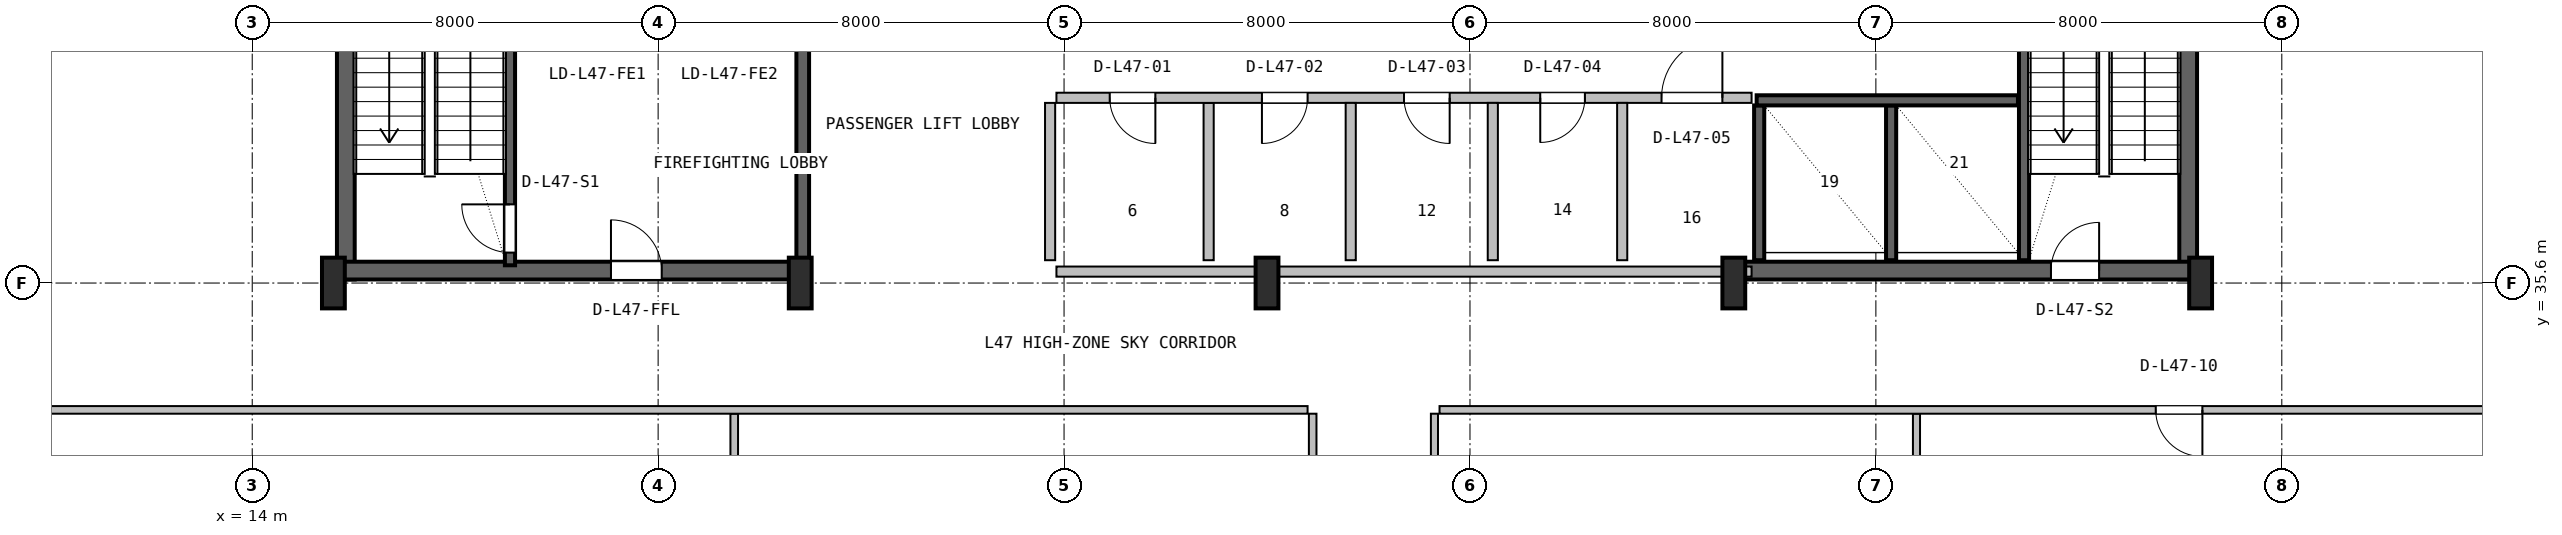
"""IFC4 building model, lengths in metres.
Left out: names, types, materials, properties, quantities, classifications, styles, units other than length and angle.
Written with IfcOpenShell. Run it as: python <this file> out.ifc"""

import sys

from ifc_helpers import new_model, si_unit, direction, frame, frame_2d, origin, origin_2d, place, context, subcontext, project, spatial, rectangle, i_section, extrude, source, transform, mapped, element, fill, save


model = new_model("IFC4")
c1 = context("Model", 3, precision=1e-05, world=origin(), true_north=direction((0.0, 1.0)))
c2 = subcontext(c1, "Body", "Model", "MODEL_VIEW")
j1 = project(units=[si_unit("LENGTHUNIT", "METRE"), si_unit("PLANEANGLEUNIT", "RADIAN")], contexts=[c1])
p1 = place(None, origin())
s1 = spatial("IfcSite", under=j1, at=p1, CompositionType="ELEMENT")
p2 = place(p1, origin())
s2 = spatial("IfcBuilding", under=s1, at=p2, CompositionType="ELEMENT")
p3 = place(p2, frame((0.0, 0.0, 191.4)))
s3 = spatial("IfcBuildingStorey", under=s2, at=p3, CompositionType="ELEMENT", Elevation=191.4)
for number, where, z_axis, x_axis in (
    (1, (15.845, 35.67, 0.0), (0.0, 0.0, 1.0), (0.0, 1.0, 0.0)),
    (2, (52.155, 35.67, 0.0), (0.0, 0.0, 1.0), (0.0, 1.0, 0.0)),
):
    element("IfcWall", number, at=place(p3, frame(where, z_axis=z_axis, x_axis=x_axis)), inside=s3, PredefinedType="SHEAR", context=c2, shape_type="SweptSolid", body=[
        extrude(rectangle(XDim=11.13, YDim=0.35, at=frame_2d((5.565, 0.0))), origin(), (0.0, 0.0, 1.0), 4.35),
    ])
p4 = place(p3, frame((15.67, 35.845, 0.0), z_axis=(0.0, 0.0, 1.0), x_axis=(1.0, 0.0, 0.0)))
e3 = element("IfcWall", 3, at=p4, inside=s3, PredefinedType="SHEAR", context=c2, shape_type="SweptSolid", body=[
    extrude(rectangle(XDim=9.13, YDim=0.35, at=frame_2d((4.565, 0.0))), origin(), (0.0, 0.0, 1.0), 4.35),
])
p5 = place(p4, frame((5.4, 0.0, 0.0)))
e4 = element("IfcOpeningElement", 4, at=p5, cuts=e3, PredefinedType="OPENING", context=c2, shape_type="SweptSolid", body=[
    extrude(rectangle(XDim=1.0, YDim=2.1, at=frame_2d((0.5, 1.05))), frame((0.0, 0.185, 0.0), z_axis=(0.0, -1.0, 0.0), x_axis=(1.0, 0.0, 0.0)), (0.0, 0.0, 1.0), 0.37),
])
p6 = place(p3, frame((43.2, 35.845, 0.0), z_axis=(0.0, 0.0, 1.0), x_axis=(1.0, 0.0, 0.0)))
e5 = element("IfcWall", 5, at=p6, inside=s3, PredefinedType="SHEAR", context=c2, shape_type="SweptSolid", body=[
    extrude(rectangle(XDim=9.13, YDim=0.35, at=frame_2d((4.565, 0.0))), origin(), (0.0, 0.0, 1.0), 4.35),
])
p7 = place(p6, frame((6.25, 0.0, 0.0)))
e6 = element("IfcOpeningElement", 6, at=p7, cuts=e5, PredefinedType="OPENING", context=c2, shape_type="SweptSolid", body=[
    extrude(rectangle(XDim=0.95, YDim=2.1, at=frame_2d((0.475, 1.05))), frame((0.0, 0.185, 0.0), z_axis=(0.0, -1.0, 0.0), x_axis=(1.0, 0.0, 0.0)), (0.0, 0.0, 1.0), 0.37),
])
m1 = source(origin(), c2, "Body", "SweptSolid", [
    extrude(i_section(OverallWidth=0.45, OverallDepth=1.0, WebThickness=0.016, FlangeThickness=0.03, FilletRadius=0.016, at=origin_2d()), origin(), (0.0, 0.0, 1.0), 4.6),
])
for number, where, z_axis, x_axis in (
    (7, (15.6, 35.6, 0.0), (0.0, 0.0, 1.0), (1.0, 0.0, 0.0)),
    (8, (24.8, 35.6, 0.0), (0.0, 0.0, 1.0), (1.0, 0.0, 0.0)),
    (9, (34.0, 35.6, 0.0), (0.0, 0.0, 1.0), (1.0, 0.0, 0.0)),
    (10, (43.2, 35.6, 0.0), (0.0, 0.0, 1.0), (1.0, 0.0, 0.0)),
    (11, (52.4, 35.6, 0.0), (0.0, 0.0, 1.0), (1.0, 0.0, 0.0)),
):
    element("IfcColumn", number, at=place(p3, frame(where, z_axis=z_axis, x_axis=x_axis)), inside=s3, PredefinedType="COLUMN", context=c2, shape_type="MappedRepresentation", body=[
        mapped(m1, transform((0.0, 0.0, 0.0), x_axis=(1.0, 0.0, 0.0), y_axis=(0.0, 1.0, 0.0), z_axis=(0.0, 0.0, 1.0), scale=1.0)),
    ])
p8 = place(p3, frame((19.08, 35.95, 0.0), z_axis=(0.0, 0.0, 1.0), x_axis=(0.0, 1.0, 0.0)))
e12 = element("IfcWall", 12, at=p8, inside=s3, PredefinedType="SHEAR", context=c2, shape_type="SweptSolid", body=[
    extrude(rectangle(XDim=9.65, YDim=0.2, at=frame_2d((4.825, 0.0))), origin(), (0.0, 0.0, 1.0), 4.35),
])
p9 = place(p8, frame((0.25, 0.0, 0.0)))
e13 = element("IfcOpeningElement", 13, at=p9, cuts=e12, PredefinedType="OPENING", context=c2, shape_type="SweptSolid", body=[
    extrude(rectangle(XDim=0.95, YDim=2.1, at=frame_2d((0.475, 1.05))), frame((0.0, 0.11, 0.0), z_axis=(0.0, -1.0, 0.0), x_axis=(1.0, 0.0, 0.0)), (0.0, 0.0, 1.0), 0.22),
])
p10 = place(p3, frame((24.85, 36.05, 0.0), z_axis=(0.0, 0.0, 1.0), x_axis=(0.0, 1.0, 0.0)))
e14 = element("IfcWall", 14, at=p10, inside=s3, PredefinedType="SHEAR", context=c2, shape_type="SweptSolid", body=[
    extrude(rectangle(XDim=10.45, YDim=0.25, at=frame_2d((5.225, 0.0))), origin(), (0.0, 0.0, 1.0), 4.35),
])
p11 = place(p3, frame((48.92, 36.05, 0.0), z_axis=(0.0, 0.0, 1.0), x_axis=(0.0, 1.0, 0.0)))
e15 = element("IfcWall", 15, at=p11, inside=s3, PredefinedType="SHEAR", context=c2, shape_type="SweptSolid", body=[
    extrude(rectangle(XDim=10.5, YDim=0.2, at=frame_2d((5.25, 0.0))), origin(), (0.0, 0.0, 1.0), 4.35),
])
for number, where, z_axis, x_axis in (
    (16, (43.7, 36.05, 0.0), (0.0, 0.0, 1.0), (0.0, 1.0, 0.0)),
    (17, (46.3, 36.05, 0.0), (0.0, 0.0, 1.0), (0.0, 1.0, 0.0)),
):
    element("IfcWall", number, at=place(p3, frame(where, z_axis=z_axis, x_axis=x_axis)), inside=s3, PredefinedType="SHEAR", context=c2, shape_type="SweptSolid", body=[
        extrude(rectangle(XDim=3.05, YDim=0.2, at=frame_2d((1.525, 0.0))), origin(), (0.0, 0.0, 1.0), 4.35),
    ])
p12 = place(p3, frame((43.65, 39.2, 0.0), z_axis=(0.0, 0.0, 1.0), x_axis=(1.0, 0.0, 0.0)))
e18 = element("IfcWall", 18, at=p12, inside=s3, PredefinedType="SHEAR", context=c2, shape_type="SweptSolid", body=[
    extrude(rectangle(XDim=5.15, YDim=0.2, at=frame_2d((2.575, 0.0))), origin(), (0.0, 0.0, 1.0), 4.35),
])
p13 = place(p3, frame((29.85, 35.825, 0.0), z_axis=(0.0, 0.0, 1.0), x_axis=(1.0, 0.0, 0.0)))
e19 = element("IfcWall", 19, at=p13, inside=s3, PredefinedType="SOLIDWALL", context=c2, shape_type="SweptSolid", body=[
    extrude(rectangle(XDim=13.7, YDim=0.2, at=frame_2d((6.85, 0.0))), origin(), (0.0, 0.0, 1.0), 3.375),
])
p14 = place(p3, frame((32.85, 36.05, 0.0), z_axis=(0.0, 0.0, 1.0), x_axis=(0.0, 1.0, 0.0)))
e20 = element("IfcWall", 20, at=p14, inside=s3, PredefinedType="PLUMBINGWALL", context=c2, shape_type="SweptSolid", body=[
    extrude(rectangle(XDim=3.1, YDim=0.2, at=frame_2d((1.55, 0.0))), origin(), (0.0, 0.0, 1.0), 4.33),
])
p15 = place(p3, frame((29.85, 39.25, 0.0), z_axis=(0.0, 0.0, 1.0), x_axis=(1.0, 0.0, 0.0)))
e21 = element("IfcWall", 21, at=p15, inside=s3, PredefinedType="SOLIDWALL", context=c2, shape_type="SweptSolid", body=[
    extrude(rectangle(XDim=13.7, YDim=0.2, at=frame_2d((6.85, 0.0))), origin(), (0.0, 0.0, 1.0), 4.33),
])
p16 = place(p15, frame((1.05, 0.0, 0.0)))
e22 = element("IfcOpeningElement", 22, at=p16, cuts=e21, PredefinedType="OPENING", context=c2, shape_type="SweptSolid", body=[
    extrude(rectangle(XDim=0.9, YDim=2.06, at=frame_2d((0.45, 1.03))), frame((0.0, 0.11, 0.0), z_axis=(0.0, -1.0, 0.0), x_axis=(1.0, 0.0, 0.0)), (0.0, 0.0, 1.0), 0.22),
])
p17 = place(p15, frame((4.05, 0.0, 0.0)))
e23 = element("IfcOpeningElement", 23, at=p17, cuts=e21, PredefinedType="OPENING", context=c2, shape_type="SweptSolid", body=[
    extrude(rectangle(XDim=0.9, YDim=2.06, at=frame_2d((0.45, 1.03))), frame((0.0, 0.11, 0.0), z_axis=(0.0, -1.0, 0.0), x_axis=(1.0, 0.0, 0.0)), (0.0, 0.0, 1.0), 0.22),
])
p18 = place(p15, frame((6.85, 0.0, 0.0)))
e24 = element("IfcOpeningElement", 24, at=p18, cuts=e21, PredefinedType="OPENING", context=c2, shape_type="SweptSolid", body=[
    extrude(rectangle(XDim=0.9, YDim=2.06, at=frame_2d((0.45, 1.03))), frame((0.0, 0.11, 0.0), z_axis=(0.0, -1.0, 0.0), x_axis=(1.0, 0.0, 0.0)), (0.0, 0.0, 1.0), 0.22),
])
p19 = place(p15, frame((9.535, 0.0, 0.0)))
e25 = element("IfcOpeningElement", 25, at=p19, cuts=e21, PredefinedType="OPENING", context=c2, shape_type="SweptSolid", body=[
    extrude(rectangle(XDim=0.88, YDim=2.06, at=frame_2d((0.44, 1.03))), frame((0.0, 0.11, 0.0), z_axis=(0.0, -1.0, 0.0), x_axis=(1.0, 0.0, 0.0)), (0.0, 0.0, 1.0), 0.22),
])
p20 = place(p15, frame((11.925, 0.0, 0.0)))
e26 = element("IfcOpeningElement", 26, at=p20, cuts=e21, PredefinedType="OPENING", context=c2, shape_type="SweptSolid", body=[
    extrude(rectangle(XDim=1.2, YDim=2.1, at=frame_2d((0.6, 1.05))), frame((0.0, 0.11, 0.0), z_axis=(0.0, -1.0, 0.0), x_axis=(1.0, 0.0, 0.0)), (0.0, 0.0, 1.0), 0.22),
])
for number, where, z_axis, x_axis in (
    (27, (29.725, 36.05, 0.0), (0.0, 0.0, 1.0), (0.0, 1.0, 0.0)),
    (28, (35.65, 36.05, 0.0), (0.0, 0.0, 1.0), (0.0, 1.0, 0.0)),
    (29, (38.45, 36.05, 0.0), (0.0, 0.0, 1.0), (0.0, 1.0, 0.0)),
):
    element("IfcWall", number, at=place(p3, frame(where, z_axis=z_axis, x_axis=x_axis)), inside=s3, PredefinedType="PLUMBINGWALL", context=c2, shape_type="SweptSolid", body=[
        extrude(rectangle(XDim=3.1, YDim=0.2, at=frame_2d((1.55, 0.0))), origin(), (0.0, 0.0, 1.0), 4.33),
    ])
p21 = place(p3, frame((41.0, 36.05, 0.0), z_axis=(0.0, 0.0, 1.0), x_axis=(0.0, 1.0, 0.0)))
e30 = element("IfcWall", 30, at=p21, inside=s3, PredefinedType="SOLIDWALL", context=c2, shape_type="SweptSolid", body=[
    extrude(rectangle(XDim=3.1, YDim=0.2, at=frame_2d((1.55, 0.0))), origin(), (0.0, 0.0, 1.0), 4.33),
])
p22 = place(p3, frame((34.9, 7.38, 0.0), z_axis=(0.0, 0.0, 1.0), x_axis=(0.0, 1.0, 0.0)))
e31 = element("IfcWall", 31, at=p22, inside=s3, PredefinedType="PARTITIONING", context=c2, shape_type="SweptSolid", body=[
    extrude(rectangle(XDim=25.645, YDim=0.15, at=frame_2d((12.823, 0.0))), origin(), (0.0, 0.0, 1.0), 3.709),
])
p23 = place(p22, frame((6.54, 0.0, 0.0)))
e32 = element("IfcOpeningElement", 32, at=p23, cuts=e31, PredefinedType="OPENING", context=c2, shape_type="SweptSolid", body=[
    extrude(rectangle(XDim=1.55, YDim=2.12, at=frame_2d((0.775, 1.06))), frame((0.0, 0.085, 0.0), z_axis=(0.0, -1.0, 0.0), x_axis=(1.0, 0.0, 0.0)), (0.0, 0.0, 1.0), 0.17),
])
p24 = place(p22, frame((19.195, 0.0, 0.0)))
e33 = element("IfcOpeningElement", 33, at=p24, cuts=e31, PredefinedType="OPENING", context=c2, shape_type="SweptSolid", body=[
    extrude(rectangle(XDim=1.05, YDim=2.1, at=frame_2d((0.525, 1.05))), frame((0.0, 0.085, 0.0), z_axis=(0.0, -1.0, 0.0), x_axis=(1.0, 0.0, 0.0)), (0.0, 0.0, 1.0), 0.17),
])
p25 = place(p3, frame((23.5, 21.075, 0.0), z_axis=(0.0, 0.0, 1.0), x_axis=(0.0, 1.0, 0.0)))
e34 = element("IfcWall", 34, at=p25, inside=s3, PredefinedType="PARTITIONING", context=c2, shape_type="SweptSolid", body=[
    extrude(rectangle(XDim=11.95, YDim=0.15, at=frame_2d((5.975, 0.0))), origin(), (0.0, 0.0, 1.0), 4.022),
])
p26 = place(p3, frame((7.18, 33.1, 0.0), z_axis=(0.0, 0.0, 1.0), x_axis=(1.0, 0.0, 0.0)))
e35 = element("IfcWall", 35, at=p26, inside=s3, PredefinedType="PARTITIONING", context=c2, shape_type="SweptSolid", body=[
    extrude(rectangle(XDim=27.62, YDim=0.15, at=frame_2d((13.81, 0.0))), origin(), (0.0, 0.0, 1.0), 3.709),
])
p27 = place(p3, frame((46.8, 8.55, 0.0), z_axis=(0.0, 0.0, 1.0), x_axis=(0.0, 1.0, 0.0)))
e36 = element("IfcWall", 36, at=p27, inside=s3, PredefinedType="PARTITIONING", context=c2, shape_type="SweptSolid", body=[
    extrude(rectangle(XDim=24.475, YDim=0.14, at=frame_2d((12.237, 0.0))), origin(), (0.0, 0.0, 1.0), 4.022),
])
p28 = place(p3, frame((37.3, 7.38, 0.0), z_axis=(0.0, 0.0, 1.0), x_axis=(0.0, 1.0, 0.0)))
e37 = element("IfcWall", 37, at=p28, inside=s3, PredefinedType="PARTITIONING", context=c2, shape_type="SweptSolid", body=[
    extrude(rectangle(XDim=25.645, YDim=0.14, at=frame_2d((12.823, 0.0))), origin(), (0.0, 0.0, 1.0), 3.709),
])
p29 = place(p28, frame((7.565, 0.0, 0.0)))
e38 = element("IfcOpeningElement", 38, at=p29, cuts=e37, PredefinedType="OPENING", context=c2, shape_type="SweptSolid", body=[
    extrude(rectangle(XDim=1.0, YDim=2.1, at=frame_2d((0.5, 1.05))), frame((0.0, 0.08, 0.0), z_axis=(0.0, -1.0, 0.0), x_axis=(1.0, 0.0, 0.0)), (0.0, 0.0, 1.0), 0.16),
])
p30 = place(p28, frame((20.03, 0.0, 0.0)))
e39 = element("IfcOpeningElement", 39, at=p30, cuts=e37, PredefinedType="OPENING", context=c2, shape_type="SweptSolid", body=[
    extrude(rectangle(XDim=0.88, YDim=2.06, at=frame_2d((0.44, 1.03))), frame((0.0, 0.08, 0.0), z_axis=(0.0, -1.0, 0.0), x_axis=(1.0, 0.0, 0.0)), (0.0, 0.0, 1.0), 0.16),
])
p31 = place(p3, frame((37.4, 33.1, 0.0), z_axis=(0.0, 0.0, 1.0), x_axis=(1.0, 0.0, 0.0)))
e40 = element("IfcWall", 40, at=p31, inside=s3, PredefinedType="PARTITIONING", context=c2, shape_type="SweptSolid", body=[
    extrude(rectangle(XDim=23.42, YDim=0.15, at=frame_2d((11.71, 0.0))), origin(), (0.0, 0.0, 1.0), 3.709),
])
p32 = place(p31, frame((14.115, 0.0, 0.0)))
e41 = element("IfcOpeningElement", 41, at=p32, cuts=e40, PredefinedType="OPENING", context=c2, shape_type="SweptSolid", body=[
    extrude(rectangle(XDim=0.92, YDim=2.08, at=frame_2d((0.46, 1.04))), frame((0.0, 0.085, 0.0), z_axis=(0.0, -1.0, 0.0), x_axis=(1.0, 0.0, 0.0)), (0.0, 0.0, 1.0), 0.17),
])
m2 = source(origin(), c2, "Body", "SweptSolid", [
    extrude(rectangle(XDim=0.95, YDim=2.1, at=frame_2d((0.475, 1.05))), frame((0.0, 0.025, 0.0), z_axis=(0.0, -1.0, 0.0), x_axis=(1.0, 0.0, 0.0)), (0.0, 0.0, 1.0), 0.05),
])
p33 = place(p9, origin())
e42 = element("IfcDoor", 42, at=p33, inside=s3, OperationType="SINGLE_SWING_RIGHT", PredefinedType="DOOR", context=c2, shape_type="MappedRepresentation", body=[
    mapped(m2, transform((0.0, 0.0, 0.0), x_axis=(1.0, 0.0, 0.0), y_axis=(0.0, 1.0, 0.0), z_axis=(0.0, 0.0, 1.0), scale=1.0)),
])
fill(e13, e42)
m3 = source(origin(), c2, "Body", "SweptSolid", [
    extrude(rectangle(XDim=1.0, YDim=2.1, at=frame_2d((0.5, 1.05))), frame((0.0, 0.025, 0.0), z_axis=(0.0, -1.0, 0.0), x_axis=(1.0, 0.0, 0.0)), (0.0, 0.0, 1.0), 0.05),
])
p34 = place(p5, origin())
e43 = element("IfcDoor", 43, at=p34, inside=s3, OperationType="SINGLE_SWING_LEFT", PredefinedType="DOOR", context=c2, shape_type="MappedRepresentation", body=[
    mapped(m3, transform((0.0, 0.0, 0.0), x_axis=(1.0, 0.0, 0.0), y_axis=(0.0, 1.0, 0.0), z_axis=(0.0, 0.0, 1.0), scale=1.0)),
])
fill(e4, e43)
p35 = place(p7, origin())
e44 = element("IfcDoor", 44, at=p35, inside=s3, OperationType="SINGLE_SWING_RIGHT", PredefinedType="DOOR", context=c2, shape_type="MappedRepresentation", body=[
    mapped(m2, transform((0.0, 0.0, 0.0), x_axis=(1.0, 0.0, 0.0), y_axis=(0.0, 1.0, 0.0), z_axis=(0.0, 0.0, 1.0), scale=1.0)),
])
fill(e6, e44)
m4 = source(origin(), c2, "Body", "SweptSolid", [
    extrude(rectangle(XDim=0.9, YDim=2.06, at=frame_2d((0.45, 1.03))), frame((0.0, 0.025, 0.0), z_axis=(0.0, -1.0, 0.0), x_axis=(1.0, 0.0, 0.0)), (0.0, 0.0, 1.0), 0.05),
])
p36 = place(p16, frame((0.9, 0.0, 0.0), z_axis=(0.0, 0.0, 1.0), x_axis=(-1.0, 0.0, 0.0)))
e45 = element("IfcDoor", 45, at=p36, inside=s3, OperationType="SINGLE_SWING_RIGHT", PredefinedType="DOOR", context=c2, shape_type="MappedRepresentation", body=[
    mapped(m4, transform((0.0, 0.0, 0.0), x_axis=(1.0, 0.0, 0.0), y_axis=(0.0, 1.0, 0.0), z_axis=(0.0, 0.0, 1.0), scale=1.0)),
])
fill(e22, e45)
p37 = place(p17, frame((0.9, 0.0, 0.0), z_axis=(0.0, 0.0, 1.0), x_axis=(-1.0, 0.0, 0.0)))
e46 = element("IfcDoor", 46, at=p37, inside=s3, OperationType="SINGLE_SWING_LEFT", PredefinedType="DOOR", context=c2, shape_type="MappedRepresentation", body=[
    mapped(m4, transform((0.0, 0.0, 0.0), x_axis=(1.0, 0.0, 0.0), y_axis=(0.0, 1.0, 0.0), z_axis=(0.0, 0.0, 1.0), scale=1.0)),
])
fill(e23, e46)
p38 = place(p18, frame((0.9, 0.0, 0.0), z_axis=(0.0, 0.0, 1.0), x_axis=(-1.0, 0.0, 0.0)))
e47 = element("IfcDoor", 47, at=p38, inside=s3, OperationType="SINGLE_SWING_RIGHT", PredefinedType="DOOR", context=c2, shape_type="MappedRepresentation", body=[
    mapped(m4, transform((0.0, 0.0, 0.0), x_axis=(1.0, 0.0, 0.0), y_axis=(0.0, 1.0, 0.0), z_axis=(0.0, 0.0, 1.0), scale=1.0)),
])
fill(e24, e47)
m5 = source(origin(), c2, "Body", "SweptSolid", [
    extrude(rectangle(XDim=0.88, YDim=2.06, at=frame_2d((0.44, 1.03))), frame((0.0, 0.025, 0.0), z_axis=(0.0, -1.0, 0.0), x_axis=(1.0, 0.0, 0.0)), (0.0, 0.0, 1.0), 0.05),
])
p39 = place(p19, frame((0.88, 0.0, 0.0), z_axis=(0.0, 0.0, 1.0), x_axis=(-1.0, 0.0, 0.0)))
e48 = element("IfcDoor", 48, at=p39, inside=s3, OperationType="SINGLE_SWING_LEFT", PredefinedType="DOOR", context=c2, shape_type="MappedRepresentation", body=[
    mapped(m5, transform((0.0, 0.0, 0.0), x_axis=(1.0, 0.0, 0.0), y_axis=(0.0, 1.0, 0.0), z_axis=(0.0, 0.0, 1.0), scale=1.0)),
])
fill(e25, e48)
m6 = source(origin(), c2, "Body", "SweptSolid", [
    extrude(rectangle(XDim=1.2, YDim=2.1, at=frame_2d((0.6, 1.05))), frame((0.0, 0.025, 0.0), z_axis=(0.0, -1.0, 0.0), x_axis=(1.0, 0.0, 0.0)), (0.0, 0.0, 1.0), 0.05),
])
p40 = place(p20, origin())
e49 = element("IfcDoor", 49, at=p40, inside=s3, OperationType="SINGLE_SWING_RIGHT", PredefinedType="DOOR", context=c2, shape_type="MappedRepresentation", body=[
    mapped(m6, transform((0.0, 0.0, 0.0), x_axis=(1.0, 0.0, 0.0), y_axis=(0.0, 1.0, 0.0), z_axis=(0.0, 0.0, 1.0), scale=1.0)),
])
fill(e26, e49)
m7 = source(origin(), c2, "Body", "SweptSolid", [
    extrude(rectangle(XDim=0.92, YDim=2.08, at=frame_2d((0.46, 1.04))), frame((0.0, 0.025, 0.0), z_axis=(0.0, -1.0, 0.0), x_axis=(1.0, 0.0, 0.0)), (0.0, 0.0, 1.0), 0.05),
])
p41 = place(p32, frame((0.92, 0.0, 0.0), z_axis=(0.0, 0.0, 1.0), x_axis=(-1.0, 0.0, 0.0)))
e50 = element("IfcDoor", 50, at=p41, inside=s3, OperationType="SINGLE_SWING_RIGHT", PredefinedType="DOOR", context=c2, shape_type="MappedRepresentation", body=[
    mapped(m7, transform((0.0, 0.0, 0.0), x_axis=(1.0, 0.0, 0.0), y_axis=(0.0, 1.0, 0.0), z_axis=(0.0, 0.0, 1.0), scale=1.0)),
])
fill(e41, e50)
save(model, sys.argv[1])
